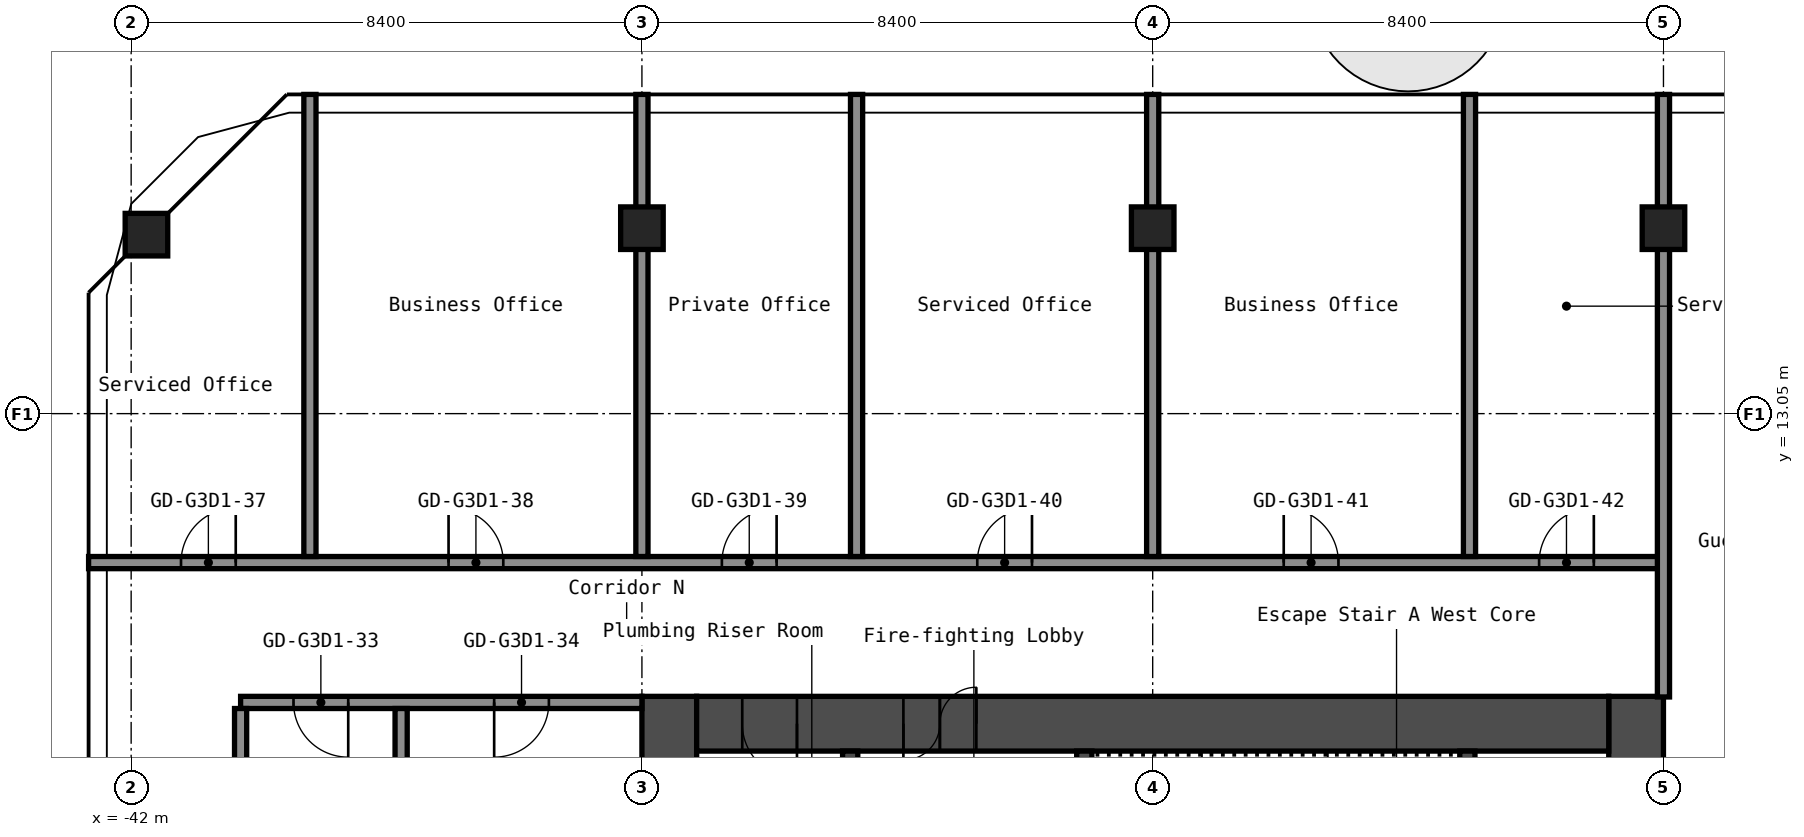
"""IFC4 building model, lengths in metres.
Left out: names, types, materials, properties, quantities, classifications, styles, units other than length and angle.
Written with IfcOpenShell. Run it as: python <this file> out.ifc"""

import sys

from ifc_helpers import new_model, si_unit, direction, frame, frame_2d, origin, origin_2d, place, context, subcontext, project, spatial, rectangle, hollow_rectangle, extrude, element, fill, save


model = new_model("IFC4")
c1 = context("Model", 3, precision=1e-05, world=origin(), true_north=direction((0.0, 1.0)))
c2 = subcontext(c1, "Body", "Model", "MODEL_VIEW")
j1 = project(units=[si_unit("LENGTHUNIT", "METRE"), si_unit("PLANEANGLEUNIT", "RADIAN")], contexts=[c1])
p1 = place(None, origin())
s1 = spatial("IfcSite", under=j1, at=p1, CompositionType="ELEMENT")
p2 = place(p1, origin())
s2 = spatial("IfcBuilding", under=s1, at=p2, CompositionType="ELEMENT")
p3 = place(p2, frame((0.0, 0.0, 156.6)))
s3 = spatial("IfcBuildingStorey", under=s2, at=p3, CompositionType="ELEMENT", Elevation=156.6)
for number, where, z_axis, x_axis in (
    (1, (-41.749, 15.994, 0.0), (0.0, 0.0, 1.0), (1.0, 0.0, 0.0)),
    (2, (-33.6, 16.1, 0.0), (0.0, 0.0, 1.0), (1.0, 0.0, 0.0)),
    (3, (-25.2, 16.1, 0.0), (0.0, 0.0, 1.0), (1.0, 0.0, 0.0)),
    (4, (-16.8, 16.1, 0.0), (0.0, 0.0, 1.0), (1.0, 0.0, 0.0)),
):
    element("IfcColumn", number, at=place(p3, frame(where, z_axis=z_axis, x_axis=x_axis)), inside=s3, PredefinedType="COLUMN", context=c2, shape_type="SweptSolid", body=[
        extrude(hollow_rectangle(XDim=0.7, YDim=0.7, WallThickness=0.028, at=origin_2d()), origin(), (0.0, 0.0, 1.0), 2.75),
    ])
p4 = place(p3, frame((-17.25, -8.4, 0.0), z_axis=(0.0, 0.0, 1.0), x_axis=(0.0, 1.0, 0.0)))
e5 = element("IfcWall", 5, at=p4, inside=s3, PredefinedType="SHEAR", context=c2, shape_type="SweptSolid", body=[
    extrude(rectangle(XDim=16.8, YDim=0.9, at=frame_2d((8.4, 0.0))), origin(), (0.0, 0.0, 1.0), 2.75),
])
p5 = place(p4, frame((7.1, 0.0, 0.0)))
e6 = element("IfcOpeningElement", 6, at=p5, cuts=e5, PredefinedType="OPENING", context=c2, shape_type="SweptSolid", body=[
    extrude(rectangle(XDim=1.6, YDim=2.1, at=frame_2d((0.8, 1.05))), frame((0.0, 0.46, 0.0), z_axis=(0.0, -1.0, 0.0), x_axis=(1.0, 0.0, 0.0)), (0.0, 0.0, 1.0), 0.92),
])
p6 = place(p3, frame((-33.15, -8.4, 0.0), z_axis=(0.0, 0.0, 1.0), x_axis=(0.0, 1.0, 0.0)))
e7 = element("IfcWall", 7, at=p6, inside=s3, PredefinedType="SHEAR", context=c2, shape_type="SweptSolid", body=[
    extrude(rectangle(XDim=16.8, YDim=0.9, at=frame_2d((8.4, 0.0))), origin(), (0.0, 0.0, 1.0), 2.75),
])
p7 = place(p3, frame((-32.7, 7.95, 0.0), z_axis=(0.0, 0.0, 1.0), x_axis=(1.0, 0.0, 0.0)))
e8 = element("IfcWall", 8, at=p7, inside=s3, PredefinedType="SHEAR", context=c2, shape_type="SweptSolid", body=[
    extrude(rectangle(XDim=15.0, YDim=0.9, at=frame_2d((7.5, 0.0))), origin(), (0.0, 0.0, 1.0), 2.75),
])
p8 = place(p7, frame((3.4, 0.0, 0.0)))
e9 = element("IfcOpeningElement", 9, at=p8, cuts=e8, PredefinedType="OPENING", context=c2, shape_type="SweptSolid", body=[
    extrude(rectangle(XDim=1.2, YDim=2.1, at=frame_2d((0.6, 1.05))), frame((0.0, 0.46, 0.0), z_axis=(0.0, -1.0, 0.0), x_axis=(1.0, 0.0, 0.0)), (0.0, 0.0, 1.0), 0.92),
])
p9 = place(p7, frame((0.75, 0.0, 0.0)))
e10 = element("IfcOpeningElement", 10, at=p9, cuts=e8, PredefinedType="OPENING", context=c2, shape_type="SweptSolid", body=[
    extrude(rectangle(XDim=0.9, YDim=2.1, at=frame_2d((0.45, 1.05))), frame((0.0, 0.46, 0.0), z_axis=(0.0, -1.0, 0.0), x_axis=(1.0, 0.0, 0.0)), (0.0, 0.0, 1.0), 0.92),
])
p10 = place(p3, frame((-20.025, 1.2, 0.0), z_axis=(0.0, 0.0, 1.0), x_axis=(0.0, 1.0, 0.0)))
e11 = element("IfcWall", 11, at=p10, inside=s3, PredefinedType="SHEAR", context=c2, shape_type="SweptSolid", body=[
    extrude(rectangle(XDim=6.3, YDim=0.25, at=frame_2d((3.15, 0.0))), origin(), (0.0, 0.0, 1.0), 2.75),
])
p11 = place(p3, frame((-26.325, 3.75, 0.0), z_axis=(0.0, 0.0, 1.0), x_axis=(0.0, 1.0, 0.0)))
e12 = element("IfcWall", 12, at=p11, inside=s3, PredefinedType="SHEAR", context=c2, shape_type="SweptSolid", body=[
    extrude(rectangle(XDim=3.75, YDim=0.25, at=frame_2d((1.875, 0.0))), origin(), (0.0, 0.0, 1.0), 2.75),
])
p12 = place(p11, frame((1.25, 0.0, 0.0)))
e13 = element("IfcOpeningElement", 13, at=p12, cuts=e12, PredefinedType="OPENING", context=c2, shape_type="SweptSolid", body=[
    extrude(rectangle(XDim=1.2, YDim=2.1, at=frame_2d((0.6, 1.05))), frame((0.0, 0.135, 0.0), z_axis=(0.0, -1.0, 0.0), x_axis=(1.0, 0.0, 0.0)), (0.0, 0.0, 1.0), 0.27),
])
p13 = place(p3, frame((-30.175, 1.45, 0.0), z_axis=(0.0, 0.0, 1.0), x_axis=(0.0, 1.0, 0.0)))
e14 = element("IfcWall", 14, at=p13, inside=s3, PredefinedType="SHEAR", context=c2, shape_type="SweptSolid", body=[
    extrude(rectangle(XDim=6.05, YDim=0.25, at=frame_2d((3.025, 0.0))), origin(), (0.0, 0.0, 1.0), 2.75),
])
p14 = place(p13, frame((2.625, 0.0, 0.0)))
e15 = element("IfcOpeningElement", 15, at=p14, cuts=e14, PredefinedType="OPENING", context=c2, shape_type="SweptSolid", body=[
    extrude(rectangle(XDim=1.1, YDim=2.1, at=frame_2d((0.55, 1.05))), frame((0.0, 0.135, 0.0), z_axis=(0.0, -1.0, 0.0), x_axis=(1.0, 0.0, 0.0)), (0.0, 0.0, 1.0), 0.27),
])
p15 = place(p3, frame((-40.2, 8.3, 0.0), z_axis=(0.0, 0.0, 1.0), x_axis=(1.0, 0.0, 0.0)))
e16 = element("IfcWall", 16, at=p15, inside=s3, PredefinedType="PARTITIONING", context=c2, shape_type="SweptSolid", body=[
    extrude(rectangle(XDim=6.6, YDim=0.2, at=frame_2d((3.3, 0.0))), origin(), (0.0, 0.0, 1.0), 2.75),
])
p16 = place(p15, frame((0.87, 0.0, 0.0)))
e17 = element("IfcOpeningElement", 17, at=p16, cuts=e16, PredefinedType="OPENING", context=c2, shape_type="SweptSolid", body=[
    extrude(rectangle(XDim=0.9, YDim=2.1, at=frame_2d((0.45, 1.05))), frame((0.0, 0.11, 0.0), z_axis=(0.0, -1.0, 0.0), x_axis=(1.0, 0.0, 0.0)), (0.0, 0.0, 1.0), 0.22),
])
p17 = place(p15, frame((4.17, 0.0, 0.0)))
e18 = element("IfcOpeningElement", 18, at=p17, cuts=e16, PredefinedType="OPENING", context=c2, shape_type="SweptSolid", body=[
    extrude(rectangle(XDim=0.9, YDim=2.1, at=frame_2d((0.45, 1.05))), frame((0.0, 0.11, 0.0), z_axis=(0.0, -1.0, 0.0), x_axis=(1.0, 0.0, 0.0)), (0.0, 0.0, 1.0), 0.22),
])
p18 = place(p3, frame((-42.7, 10.6, 0.0), z_axis=(0.0, 0.0, 1.0), x_axis=(1.0, 0.0, 0.0)))
e19 = element("IfcWall", 19, at=p18, inside=s3, PredefinedType="PARTITIONING", context=c2, shape_type="SweptSolid", body=[
    extrude(rectangle(XDim=25.9, YDim=0.2, at=frame_2d((12.95, 0.0))), origin(), (0.0, 0.0, 1.0), 2.75),
])
p19 = place(p18, frame((1.52, 0.0, 0.0)))
e20 = element("IfcOpeningElement", 20, at=p19, cuts=e19, PredefinedType="OPENING", context=c2, shape_type="SweptSolid", body=[
    extrude(rectangle(XDim=0.9, YDim=2.1, at=frame_2d((0.45, 1.05))), frame((0.0, 0.11, 0.0), z_axis=(0.0, -1.0, 0.0), x_axis=(1.0, 0.0, 0.0)), (0.0, 0.0, 1.0), 0.22),
])
p20 = place(p18, frame((5.92, 0.0, 0.0)))
e21 = element("IfcOpeningElement", 21, at=p20, cuts=e19, PredefinedType="OPENING", context=c2, shape_type="SweptSolid", body=[
    extrude(rectangle(XDim=0.9, YDim=2.1, at=frame_2d((0.45, 1.05))), frame((0.0, 0.11, 0.0), z_axis=(0.0, -1.0, 0.0), x_axis=(1.0, 0.0, 0.0)), (0.0, 0.0, 1.0), 0.22),
])
p21 = place(p18, frame((10.415, 0.0, 0.0)))
e22 = element("IfcOpeningElement", 22, at=p21, cuts=e19, PredefinedType="OPENING", context=c2, shape_type="SweptSolid", body=[
    extrude(rectangle(XDim=0.9, YDim=2.1, at=frame_2d((0.45, 1.05))), frame((0.0, 0.11, 0.0), z_axis=(0.0, -1.0, 0.0), x_axis=(1.0, 0.0, 0.0)), (0.0, 0.0, 1.0), 0.22),
])
p22 = place(p18, frame((14.615, 0.0, 0.0)))
e23 = element("IfcOpeningElement", 23, at=p22, cuts=e19, PredefinedType="OPENING", context=c2, shape_type="SweptSolid", body=[
    extrude(rectangle(XDim=0.9, YDim=2.1, at=frame_2d((0.45, 1.05))), frame((0.0, 0.11, 0.0), z_axis=(0.0, -1.0, 0.0), x_axis=(1.0, 0.0, 0.0)), (0.0, 0.0, 1.0), 0.22),
])
p23 = place(p18, frame((19.655, 0.0, 0.0)))
e24 = element("IfcOpeningElement", 24, at=p23, cuts=e19, PredefinedType="OPENING", context=c2, shape_type="SweptSolid", body=[
    extrude(rectangle(XDim=0.9, YDim=2.1, at=frame_2d((0.45, 1.05))), frame((0.0, 0.11, 0.0), z_axis=(0.0, -1.0, 0.0), x_axis=(1.0, 0.0, 0.0)), (0.0, 0.0, 1.0), 0.22),
])
p24 = place(p18, frame((23.855, 0.0, 0.0)))
e25 = element("IfcOpeningElement", 25, at=p24, cuts=e19, PredefinedType="OPENING", context=c2, shape_type="SweptSolid", body=[
    extrude(rectangle(XDim=0.9, YDim=2.1, at=frame_2d((0.45, 1.05))), frame((0.0, 0.11, 0.0), z_axis=(0.0, -1.0, 0.0), x_axis=(1.0, 0.0, 0.0)), (0.0, 0.0, 1.0), 0.22),
])
p25 = place(p3, frame((-40.2, -8.2, 0.0), z_axis=(0.0, 0.0, 1.0), x_axis=(0.0, 1.0, 0.0)))
e26 = element("IfcWall", 26, at=p25, inside=s3, PredefinedType="PARTITIONING", context=c2, shape_type="SweptSolid", body=[
    extrude(rectangle(XDim=16.4, YDim=0.2, at=frame_2d((8.2, 0.0))), origin(), (0.0, 0.0, 1.0), 2.75),
])
p26 = place(p3, frame((-39.06, 10.7, 0.0), z_axis=(0.0, 0.0, 1.0), x_axis=(0.0, 1.0, 0.0)))
e27 = element("IfcWall", 27, at=p26, inside=s3, PredefinedType="PARTITIONING", context=c2, shape_type="SweptSolid", body=[
    extrude(rectangle(XDim=7.6, YDim=0.2, at=frame_2d((3.8, 0.0))), origin(), (0.0, 0.0, 1.0), 2.75),
])
p27 = place(p3, frame((-37.56, 0.0, 0.0), z_axis=(0.0, 0.0, 1.0), x_axis=(0.0, 1.0, 0.0)))
e28 = element("IfcWall", 28, at=p27, inside=s3, PredefinedType="PARTITIONING", context=c2, shape_type="SweptSolid", body=[
    extrude(rectangle(XDim=8.2, YDim=0.2, at=frame_2d((4.1, 0.0))), origin(), (0.0, 0.0, 1.0), 2.75),
])
for number, where, z_axis, x_axis in (
    (29, (-33.6, 10.7, 0.0), (0.0, 0.0, 1.0), (0.0, 1.0, 0.0)),
    (30, (-30.07, 10.7, 0.0), (0.0, 0.0, 1.0), (0.0, 1.0, 0.0)),
    (31, (-25.2, 10.7, 0.0), (0.0, 0.0, 1.0), (0.0, 1.0, 0.0)),
    (32, (-19.99, 10.7, 0.0), (0.0, 0.0, 1.0), (0.0, 1.0, 0.0)),
):
    element("IfcWall", number, at=place(p3, frame(where, z_axis=z_axis, x_axis=x_axis)), inside=s3, PredefinedType="PARTITIONING", context=c2, shape_type="SweptSolid", body=[
        extrude(rectangle(XDim=7.6, YDim=0.2, at=frame_2d((3.8, 0.0))), origin(), (0.0, 0.0, 1.0), 2.75),
    ])
p28 = place(p3, frame((-16.8, 8.39, 0.0), z_axis=(0.0, 0.0, 1.0), x_axis=(0.0, 1.0, 0.0)))
e33 = element("IfcWall", 33, at=p28, inside=s3, PredefinedType="PARTITIONING", context=c2, shape_type="SweptSolid", body=[
    extrude(rectangle(XDim=9.91, YDim=0.2, at=frame_2d((4.955, 0.0))), origin(), (0.0, 0.0, 1.0), 2.75),
])
p29 = place(p8, origin())
e34 = element("IfcDoor", 34, at=p29, inside=s3, OperationType="DOUBLE_DOOR_SINGLE_SWING", PredefinedType="DOOR", context=c2, shape_type="SweptSolid", body=[
    extrude(rectangle(XDim=1.2, YDim=2.1, at=frame_2d((0.6, 1.05))), frame((0.0, 0.025, 0.0), z_axis=(0.0, -1.0, 0.0), x_axis=(1.0, 0.0, 0.0)), (0.0, 0.0, 1.0), 0.05),
])
fill(e9, e34)
p30 = place(p9, origin())
e35 = element("IfcDoor", 35, at=p30, inside=s3, OperationType="SINGLE_SWING_RIGHT", PredefinedType="DOOR", context=c2, shape_type="SweptSolid", body=[
    extrude(rectangle(XDim=0.9, YDim=2.1, at=frame_2d((0.45, 1.05))), frame((0.0, 0.025, 0.0), z_axis=(0.0, -1.0, 0.0), x_axis=(1.0, 0.0, 0.0)), (0.0, 0.0, 1.0), 0.05),
])
fill(e10, e35)
p31 = place(p16, origin())
e36 = element("IfcDoor", 36, at=p31, inside=s3, OperationType="SINGLE_SWING_RIGHT", PredefinedType="DOOR", context=c2, shape_type="SweptSolid", body=[
    extrude(rectangle(XDim=0.9, YDim=2.1, at=frame_2d((0.45, 1.05))), frame((0.0, 0.025, 0.0), z_axis=(0.0, -1.0, 0.0), x_axis=(1.0, 0.0, 0.0)), (0.0, 0.0, 1.0), 0.05),
])
fill(e17, e36)
p32 = place(p17, origin())
e37 = element("IfcDoor", 37, at=p32, inside=s3, OperationType="SINGLE_SWING_LEFT", PredefinedType="DOOR", context=c2, shape_type="SweptSolid", body=[
    extrude(rectangle(XDim=0.9, YDim=2.1, at=frame_2d((0.45, 1.05))), frame((0.0, 0.025, 0.0), z_axis=(0.0, -1.0, 0.0), x_axis=(1.0, 0.0, 0.0)), (0.0, 0.0, 1.0), 0.05),
])
fill(e18, e37)
p33 = place(p19, origin())
e38 = element("IfcDoor", 38, at=p33, inside=s3, OperationType="SINGLE_SWING_LEFT", PredefinedType="DOOR", context=c2, shape_type="SweptSolid", body=[
    extrude(rectangle(XDim=0.9, YDim=2.1, at=frame_2d((0.45, 1.05))), frame((0.0, 0.025, 0.0), z_axis=(0.0, -1.0, 0.0), x_axis=(1.0, 0.0, 0.0)), (0.0, 0.0, 1.0), 0.05),
])
fill(e20, e38)
p34 = place(p20, origin())
e39 = element("IfcDoor", 39, at=p34, inside=s3, OperationType="SINGLE_SWING_RIGHT", PredefinedType="DOOR", context=c2, shape_type="SweptSolid", body=[
    extrude(rectangle(XDim=0.9, YDim=2.1, at=frame_2d((0.45, 1.05))), frame((0.0, 0.025, 0.0), z_axis=(0.0, -1.0, 0.0), x_axis=(1.0, 0.0, 0.0)), (0.0, 0.0, 1.0), 0.05),
])
fill(e21, e39)
p35 = place(p21, origin())
e40 = element("IfcDoor", 40, at=p35, inside=s3, OperationType="SINGLE_SWING_LEFT", PredefinedType="DOOR", context=c2, shape_type="SweptSolid", body=[
    extrude(rectangle(XDim=0.9, YDim=2.1, at=frame_2d((0.45, 1.05))), frame((0.0, 0.025, 0.0), z_axis=(0.0, -1.0, 0.0), x_axis=(1.0, 0.0, 0.0)), (0.0, 0.0, 1.0), 0.05),
])
fill(e22, e40)
p36 = place(p22, origin())
e41 = element("IfcDoor", 41, at=p36, inside=s3, OperationType="SINGLE_SWING_LEFT", PredefinedType="DOOR", context=c2, shape_type="SweptSolid", body=[
    extrude(rectangle(XDim=0.9, YDim=2.1, at=frame_2d((0.45, 1.05))), frame((0.0, 0.025, 0.0), z_axis=(0.0, -1.0, 0.0), x_axis=(1.0, 0.0, 0.0)), (0.0, 0.0, 1.0), 0.05),
])
fill(e23, e41)
p37 = place(p23, origin())
e42 = element("IfcDoor", 42, at=p37, inside=s3, OperationType="SINGLE_SWING_RIGHT", PredefinedType="DOOR", context=c2, shape_type="SweptSolid", body=[
    extrude(rectangle(XDim=0.9, YDim=2.1, at=frame_2d((0.45, 1.05))), frame((0.0, 0.025, 0.0), z_axis=(0.0, -1.0, 0.0), x_axis=(1.0, 0.0, 0.0)), (0.0, 0.0, 1.0), 0.05),
])
fill(e24, e42)
p38 = place(p24, origin())
e43 = element("IfcDoor", 43, at=p38, inside=s3, OperationType="SINGLE_SWING_LEFT", PredefinedType="DOOR", context=c2, shape_type="SweptSolid", body=[
    extrude(rectangle(XDim=0.9, YDim=2.1, at=frame_2d((0.45, 1.05))), frame((0.0, 0.025, 0.0), z_axis=(0.0, -1.0, 0.0), x_axis=(1.0, 0.0, 0.0)), (0.0, 0.0, 1.0), 0.05),
])
fill(e25, e43)
save(model, sys.argv[1])
